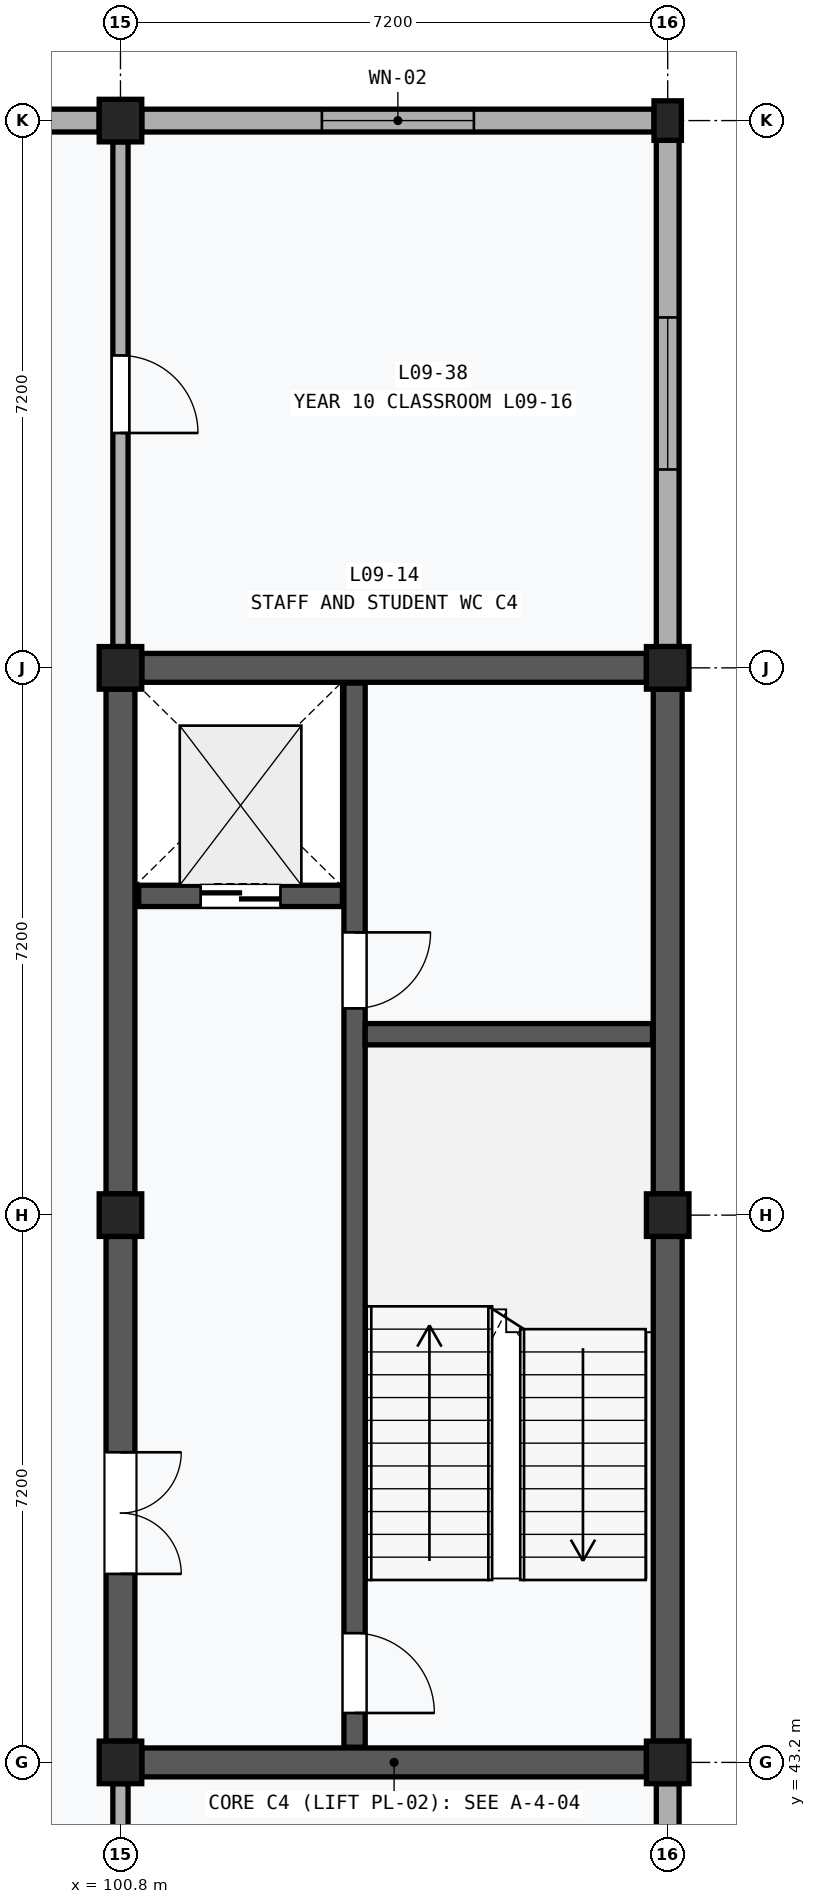
"""IFC4 building model, lengths in metres.
Left out: names, types, materials, properties, quantities, classifications, styles, units other than length and angle.
Written with IfcOpenShell. Run it as: python <this file> out.ifc"""

import sys

from ifc_helpers import new_model, si_unit, direction, frame, frame_2d, origin, origin_2d, place, context, subcontext, project, spatial, rectangle, extrude, element, fill, save


model = new_model("IFC4")
c1 = context("Model", 3, precision=1e-05, world=origin(), true_north=direction((0.0, 1.0)))
c2 = subcontext(c1, "Body", "Model", "MODEL_VIEW")
j1 = project(units=[si_unit("LENGTHUNIT", "METRE"), si_unit("PLANEANGLEUNIT", "RADIAN")], contexts=[c1])
p1 = place(None, origin())
s1 = spatial("IfcSite", under=j1, at=p1, CompositionType="ELEMENT")
p2 = place(p1, origin())
s2 = spatial("IfcBuilding", under=s1, at=p2, CompositionType="ELEMENT")
p3 = place(p2, frame((0.0, 0.0, 38.8)))
s3 = spatial("IfcBuildingStorey", under=s2, at=p3, CompositionType="ELEMENT", Elevation=38.8)
for number, where, z_axis, x_axis in (
    (1, (100.8, 43.2, 0.0), (0.0, 0.0, 1.0), (1.0, 0.0, 0.0)),
    (2, (100.8, 50.4, 0.0), (0.0, 0.0, 1.0), (1.0, 0.0, 0.0)),
    (3, (100.8, 57.6, 0.0), (0.0, 0.0, 1.0), (1.0, 0.0, 0.0)),
    (4, (100.8, 64.8, 0.0), (0.0, 0.0, 1.0), (1.0, 0.0, 0.0)),
    (5, (108.0, 43.2, 0.0), (0.0, 0.0, 1.0), (1.0, 0.0, 0.0)),
    (6, (108.0, 50.4, 0.0), (0.0, 0.0, 1.0), (1.0, 0.0, 0.0)),
    (7, (108.0, 57.6, 0.0), (0.0, 0.0, 1.0), (1.0, 0.0, 0.0)),
):
    element("IfcColumn", number, at=place(p3, frame(where, z_axis=z_axis, x_axis=x_axis)), inside=s3, PredefinedType="COLUMN", context=c2, shape_type="SweptSolid", body=[
        extrude(rectangle(XDim=0.56, YDim=0.56, at=origin_2d()), origin(), (0.0, 0.0, 1.0), 4.0),
    ])
p4 = place(p3, frame((108.0, 64.8, 0.0), z_axis=(0.0, 0.0, 1.0), x_axis=(1.0, 0.0, 0.0)))
e8 = element("IfcColumn", 8, at=p4, inside=s3, PredefinedType="PILASTER", context=c2, shape_type="SweptSolid", body=[
    extrude(rectangle(XDim=0.36, YDim=0.52, at=origin_2d()), origin(), (0.0, 0.0, 1.0), 4.0),
])
p5 = place(p3, frame((93.88, 64.8, 0.0), z_axis=(0.0, 0.0, 1.0), x_axis=(1.0, 0.0, 0.0)))
e9 = element("IfcWall", 9, at=p5, inside=s3, PredefinedType="SOLIDWALL", context=c2, shape_type="SweptSolid", body=[
    extrude(rectangle(XDim=6.64, YDim=0.3, at=frame_2d((3.32, 0.0))), origin(), (0.0, 0.0, 1.0), 3.17),
])
p6 = place(p5, frame((2.42, 0.0, 0.9)))
e10 = element("IfcOpeningElement", 10, at=p6, cuts=e9, PredefinedType="OPENING", context=c2, shape_type="SweptSolid", body=[
    extrude(rectangle(XDim=1.8, YDim=1.8, at=frame_2d((0.9, 0.9))), frame((0.0, 0.162, 0.0), z_axis=(0.0, -1.0, 0.0), x_axis=(1.0, 0.0, 0.0)), (0.0, 0.0, 1.0), 0.324),
])
p7 = place(p3, frame((108.0, 36.26, 0.0), z_axis=(0.0, 0.0, 1.0), x_axis=(0.0, 1.0, 0.0)))
e11 = element("IfcWall", 11, at=p7, inside=s3, PredefinedType="SOLIDWALL", context=c2, shape_type="SweptSolid", body=[
    extrude(rectangle(XDim=6.66, YDim=0.3, at=frame_2d((3.33, 0.0))), origin(), (0.0, 0.0, 1.0), 3.17),
])
p8 = place(p3, frame((101.08, 64.8, 0.0), z_axis=(0.0, 0.0, 1.0), x_axis=(1.0, 0.0, 0.0)))
e12 = element("IfcWall", 12, at=p8, inside=s3, PredefinedType="SOLIDWALL", context=c2, shape_type="SweptSolid", body=[
    extrude(rectangle(XDim=6.74, YDim=0.3, at=frame_2d((3.37, 0.0))), origin(), (0.0, 0.0, 1.0), 3.17),
])
p9 = place(p8, frame((2.37, 0.0, 0.9)))
e13 = element("IfcOpeningElement", 13, at=p9, cuts=e12, PredefinedType="OPENING", context=c2, shape_type="SweptSolid", body=[
    extrude(rectangle(XDim=2.0, YDim=1.8, at=frame_2d((1.0, 0.9))), frame((0.0, 0.162, 0.0), z_axis=(0.0, -1.0, 0.0), x_axis=(1.0, 0.0, 0.0)), (0.0, 0.0, 1.0), 0.324),
])
p10 = place(p3, frame((108.0, 57.88, 0.0), z_axis=(0.0, 0.0, 1.0), x_axis=(0.0, 1.0, 0.0)))
e14 = element("IfcWall", 14, at=p10, inside=s3, PredefinedType="SOLIDWALL", context=c2, shape_type="SweptSolid", body=[
    extrude(rectangle(XDim=6.66, YDim=0.3, at=frame_2d((3.33, 0.0))), origin(), (0.0, 0.0, 1.0), 3.17),
])
p11 = place(p10, frame((2.33, 0.0, 0.9)))
e15 = element("IfcOpeningElement", 15, at=p11, cuts=e14, PredefinedType="OPENING", context=c2, shape_type="SweptSolid", body=[
    extrude(rectangle(XDim=2.0, YDim=1.8, at=frame_2d((1.0, 0.9))), frame((0.0, 0.162, 0.0), z_axis=(0.0, -1.0, 0.0), x_axis=(1.0, 0.0, 0.0)), (0.0, 0.0, 1.0), 0.324),
])
p12 = place(p3, frame((100.8, 43.48, 0.0), z_axis=(0.0, 0.0, 1.0), x_axis=(0.0, 1.0, 0.0)))
e16 = element("IfcWall", 16, at=p12, inside=s3, PredefinedType="SHEAR", context=c2, shape_type="SweptSolid", body=[
    extrude(rectangle(XDim=6.64, YDim=0.38, at=frame_2d((3.32, 0.0))), origin(), (0.0, 0.0, 1.0), 3.01),
])
p13 = place(p12, frame((2.2, 0.0, 0.0)))
e17 = element("IfcOpeningElement", 17, at=p13, cuts=e16, PredefinedType="OPENING", context=c2, shape_type="SweptSolid", body=[
    extrude(rectangle(XDim=1.6, YDim=2.2, at=frame_2d((0.8, 1.1))), frame((0.0, 0.202, 0.0), z_axis=(0.0, -1.0, 0.0), x_axis=(1.0, 0.0, 0.0)), (0.0, 0.0, 1.0), 0.404),
])
p14 = place(p3, frame((100.8, 50.68, 0.0), z_axis=(0.0, 0.0, 1.0), x_axis=(0.0, 1.0, 0.0)))
e18 = element("IfcWall", 18, at=p14, inside=s3, PredefinedType="SHEAR", context=c2, shape_type="SweptSolid", body=[
    extrude(rectangle(XDim=6.64, YDim=0.38, at=frame_2d((3.32, 0.0))), origin(), (0.0, 0.0, 1.0), 3.01),
])
for number, where, z_axis, x_axis in (
    (19, (108.0, 43.48, 0.0), (0.0, 0.0, 1.0), (0.0, 1.0, 0.0)),
    (20, (108.0, 50.68, 0.0), (0.0, 0.0, 1.0), (0.0, 1.0, 0.0)),
):
    element("IfcWall", number, at=place(p3, frame(where, z_axis=z_axis, x_axis=x_axis)), inside=s3, PredefinedType="SHEAR", context=c2, shape_type="SweptSolid", body=[
        extrude(rectangle(XDim=6.64, YDim=0.38, at=frame_2d((3.32, 0.0))), origin(), (0.0, 0.0, 1.0), 3.17),
    ])
for number, where, z_axis, x_axis in (
    (21, (101.08, 43.2, 0.0), (0.0, 0.0, 1.0), (1.0, 0.0, 0.0)),
    (22, (101.08, 57.6, 0.0), (0.0, 0.0, 1.0), (1.0, 0.0, 0.0)),
):
    element("IfcWall", number, at=place(p3, frame(where, z_axis=z_axis, x_axis=x_axis)), inside=s3, PredefinedType="SHEAR", context=c2, shape_type="SweptSolid", body=[
        extrude(rectangle(XDim=6.64, YDim=0.38, at=frame_2d((3.32, 0.0))), origin(), (0.0, 0.0, 1.0), 3.01),
    ])
p15 = place(p3, frame((103.88, 43.4, 0.0), z_axis=(0.0, 0.0, 1.0), x_axis=(0.0, 1.0, 0.0)))
e23 = element("IfcWall", 23, at=p15, inside=s3, PredefinedType="SHEAR", context=c2, shape_type="SweptSolid", body=[
    extrude(rectangle(XDim=14.0, YDim=0.28, at=frame_2d((7.0, 0.0))), origin(), (0.0, 0.0, 1.0), 3.74),
])
p16 = place(p15, frame((0.45, 0.0, 0.0)))
e24 = element("IfcOpeningElement", 24, at=p16, cuts=e23, PredefinedType="OPENING", context=c2, shape_type="SweptSolid", body=[
    extrude(rectangle(XDim=1.05, YDim=2.15, at=frame_2d((0.525, 1.075))), frame((0.0, 0.152, 0.0), z_axis=(0.0, -1.0, 0.0), x_axis=(1.0, 0.0, 0.0)), (0.0, 0.0, 1.0), 0.304),
])
p17 = place(p15, frame((9.72, 0.0, 0.0)))
e25 = element("IfcOpeningElement", 25, at=p17, cuts=e23, PredefinedType="OPENING", context=c2, shape_type="SweptSolid", body=[
    extrude(rectangle(XDim=1.0, YDim=2.15, at=frame_2d((0.5, 1.075))), frame((0.0, 0.152, 0.0), z_axis=(0.0, -1.0, 0.0), x_axis=(1.0, 0.0, 0.0)), (0.0, 0.0, 1.0), 0.304),
])
p18 = place(p3, frame((104.02, 52.78, 0.0), z_axis=(0.0, 0.0, 1.0), x_axis=(1.0, 0.0, 0.0)))
e26 = element("IfcWall", 26, at=p18, inside=s3, PredefinedType="SHEAR", context=c2, shape_type="SweptSolid", body=[
    extrude(rectangle(XDim=3.78, YDim=0.28, at=frame_2d((1.89, 0.0))), origin(), (0.0, 0.0, 1.0), 3.74),
])
p19 = place(p3, frame((101.04, 54.6, 0.0), z_axis=(0.0, 0.0, 1.0), x_axis=(1.0, 0.0, 0.0)))
e27 = element("IfcWall", 27, at=p19, inside=s3, PredefinedType="SHEAR", context=c2, shape_type="SweptSolid", body=[
    extrude(rectangle(XDim=2.68, YDim=0.28, at=frame_2d((1.34, 0.0))), origin(), (0.0, 0.0, 1.0), 3.74),
])
p20 = place(p19, frame((0.815, 0.0, 0.0)))
e28 = element("IfcOpeningElement", 28, at=p20, cuts=e27, PredefinedType="OPENING", context=c2, shape_type="SweptSolid", body=[
    extrude(rectangle(XDim=1.05, YDim=2.2, at=frame_2d((0.525, 1.1))), frame((0.0, 0.152, 0.0), z_axis=(0.0, -1.0, 0.0), x_axis=(1.0, 0.0, 0.0)), (0.0, 0.0, 1.0), 0.304),
])
p21 = place(p3, frame((100.8, 36.28, 0.0), z_axis=(0.0, 0.0, 1.0), x_axis=(0.0, 1.0, 0.0)))
e29 = element("IfcWall", 29, at=p21, inside=s3, PredefinedType="PARTITIONING", context=c2, shape_type="SweptSolid", body=[
    extrude(rectangle(XDim=6.64, YDim=0.2, at=frame_2d((3.32, 0.0))), origin(), (0.0, 0.0, 1.0), 3.01),
])
p22 = place(p21, frame((2.82, 0.0, 0.0)))
e30 = element("IfcOpeningElement", 30, at=p22, cuts=e29, PredefinedType="OPENING", context=c2, shape_type="SweptSolid", body=[
    extrude(rectangle(XDim=1.0, YDim=2.1, at=frame_2d((0.5, 1.05))), frame((0.0, 0.112, 0.0), z_axis=(0.0, -1.0, 0.0), x_axis=(1.0, 0.0, 0.0)), (0.0, 0.0, 1.0), 0.224),
])
p23 = place(p3, frame((100.8, 57.88, 0.0), z_axis=(0.0, 0.0, 1.0), x_axis=(0.0, 1.0, 0.0)))
e31 = element("IfcWall", 31, at=p23, inside=s3, PredefinedType="PARTITIONING", context=c2, shape_type="SweptSolid", body=[
    extrude(rectangle(XDim=6.64, YDim=0.2, at=frame_2d((3.32, 0.0))), origin(), (0.0, 0.0, 1.0), 3.01),
])
p24 = place(p23, frame((2.81, 0.0, 0.0)))
e32 = element("IfcOpeningElement", 32, at=p24, cuts=e31, PredefinedType="OPENING", context=c2, shape_type="SweptSolid", body=[
    extrude(rectangle(XDim=1.02, YDim=2.12, at=frame_2d((0.51, 1.06))), frame((0.0, 0.112, 0.0), z_axis=(0.0, -1.0, 0.0), x_axis=(1.0, 0.0, 0.0)), (0.0, 0.0, 1.0), 0.224),
])
p25 = place(p9, origin())
e33 = element("IfcWindow", 33, at=p25, inside=s3, PartitioningType="SINGLE_PANEL", PredefinedType="WINDOW", context=c2, shape_type="SweptSolid", body=[
    extrude(rectangle(XDim=2.0, YDim=1.8, at=frame_2d((1.0, 0.9))), frame((0.0, 0.03, 0.0), z_axis=(0.0, -1.0, 0.0), x_axis=(1.0, 0.0, 0.0)), (0.0, 0.0, 1.0), 0.06),
])
fill(e13, e33)
p26 = place(p11, origin())
e34 = element("IfcWindow", 34, at=p26, inside=s3, PartitioningType="SINGLE_PANEL", PredefinedType="WINDOW", context=c2, shape_type="SweptSolid", body=[
    extrude(rectangle(XDim=2.0, YDim=1.8, at=frame_2d((1.0, 0.9))), frame((0.0, 0.03, 0.0), z_axis=(0.0, -1.0, 0.0), x_axis=(1.0, 0.0, 0.0)), (0.0, 0.0, 1.0), 0.06),
])
fill(e15, e34)
p27 = place(p13, frame((1.6, 0.0, 0.0), z_axis=(0.0, 0.0, 1.0), x_axis=(-1.0, 0.0, 0.0)))
e35 = element("IfcDoor", 35, at=p27, inside=s3, OperationType="DOUBLE_DOOR_SINGLE_SWING", PredefinedType="DOOR", context=c2, shape_type="SweptSolid", body=[
    extrude(rectangle(XDim=1.6, YDim=2.2, at=frame_2d((0.8, 1.1))), frame((0.0, 0.025, 0.0), z_axis=(0.0, -1.0, 0.0), x_axis=(1.0, 0.0, 0.0)), (0.0, 0.0, 1.0), 0.05),
])
fill(e17, e35)
p28 = place(p16, frame((1.05, 0.0, 0.0), z_axis=(0.0, 0.0, 1.0), x_axis=(-1.0, 0.0, 0.0)))
e36 = element("IfcDoor", 36, at=p28, inside=s3, OperationType="SINGLE_SWING_RIGHT", PredefinedType="DOOR", context=c2, shape_type="SweptSolid", body=[
    extrude(rectangle(XDim=1.05, YDim=2.15, at=frame_2d((0.525, 1.075))), frame((0.0, 0.025, 0.0), z_axis=(0.0, -1.0, 0.0), x_axis=(1.0, 0.0, 0.0)), (0.0, 0.0, 1.0), 0.05),
])
fill(e24, e36)
p29 = place(p17, frame((1.0, 0.0, 0.0), z_axis=(0.0, 0.0, 1.0), x_axis=(-1.0, 0.0, 0.0)))
e37 = element("IfcDoor", 37, at=p29, inside=s3, OperationType="SINGLE_SWING_LEFT", PredefinedType="DOOR", context=c2, shape_type="SweptSolid", body=[
    extrude(rectangle(XDim=1.0, YDim=2.15, at=frame_2d((0.5, 1.075))), frame((0.0, 0.025, 0.0), z_axis=(0.0, -1.0, 0.0), x_axis=(1.0, 0.0, 0.0)), (0.0, 0.0, 1.0), 0.05),
])
fill(e25, e37)
p30 = place(p20, frame((1.05, 0.0, 0.0), z_axis=(0.0, 0.0, 1.0), x_axis=(-1.0, 0.0, 0.0)))
e38 = element("IfcDoor", 38, at=p30, inside=s3, OperationType="DOUBLE_DOOR_SLIDING", PredefinedType="DOOR", context=c2, shape_type="SweptSolid", body=[
    extrude(rectangle(XDim=1.05, YDim=2.2, at=frame_2d((0.525, 1.1))), frame((0.0, 0.025, 0.0), z_axis=(0.0, -1.0, 0.0), x_axis=(1.0, 0.0, 0.0)), (0.0, 0.0, 1.0), 0.05),
])
fill(e28, e38)
p31 = place(p24, frame((1.02, 0.0, 0.0), z_axis=(0.0, 0.0, 1.0), x_axis=(-1.0, 0.0, 0.0)))
e39 = element("IfcDoor", 39, at=p31, inside=s3, OperationType="SINGLE_SWING_RIGHT", PredefinedType="DOOR", context=c2, shape_type="SweptSolid", body=[
    extrude(rectangle(XDim=1.02, YDim=2.12, at=frame_2d((0.51, 1.06))), frame((0.0, 0.025, 0.0), z_axis=(0.0, -1.0, 0.0), x_axis=(1.0, 0.0, 0.0)), (0.0, 0.0, 1.0), 0.05),
])
fill(e32, e39)
save(model, sys.argv[1])
